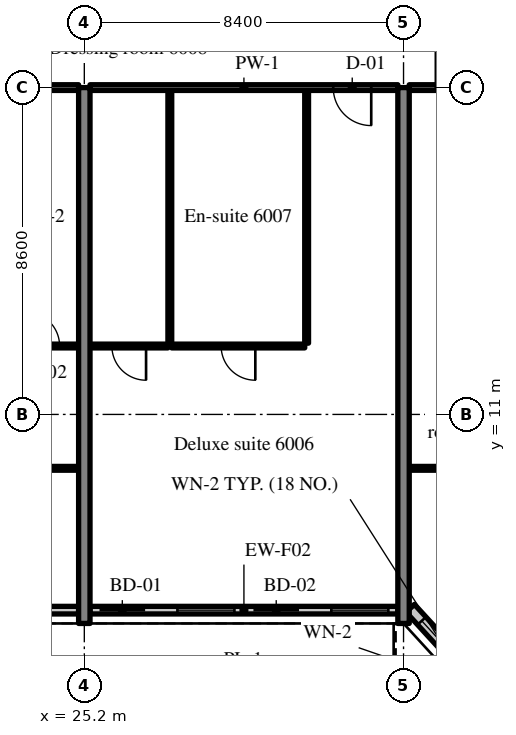
"""IFC4 building model, lengths in metres.
Left out: names, types, materials, properties, quantities, classifications, styles, units other than length and angle.
Written with IfcOpenShell. Run it as: python <this file> out.ifc"""

import sys

from ifc_helpers import new_model, si_unit, direction, frame, frame_2d, origin, place, context, subcontext, project, spatial, rectangle, extrude, source, transform, mapped, element, fill, save


model = new_model("IFC4")
c1 = context("Model", 3, precision=1e-05, world=origin(), true_north=direction((0.0, 1.0)))
c2 = subcontext(c1, "Body", "Model", "MODEL_VIEW")
j1 = project(units=[si_unit("LENGTHUNIT", "METRE"), si_unit("PLANEANGLEUNIT", "RADIAN")], contexts=[c1])
p1 = place(None, origin())
s1 = spatial("IfcSite", under=j1, at=p1, CompositionType="ELEMENT")
p2 = place(p1, origin())
s2 = spatial("IfcBuilding", under=s1, at=p2, CompositionType="ELEMENT")
p3 = place(p2, frame((0.0, 0.0, 249.1)))
s3 = spatial("IfcBuildingStorey", under=s2, at=p3, CompositionType="ELEMENT", Elevation=249.1)
m1 = source(origin(), c2, "Body", "SweptSolid", [
    extrude(rectangle(XDim=14.1, YDim=0.3, at=frame_2d((7.05, 0.0))), origin(), (0.0, 0.0, 1.0), 3.62),
])
for number, where, z_axis, x_axis in (
    (1, (25.2, 5.5, 0.0), (0.0, 0.0, 1.0), (0.0, 1.0, 0.0)),
    (2, (33.6, 5.5, 0.0), (0.0, 0.0, 1.0), (0.0, 1.0, 0.0)),
):
    element("IfcWall", number, at=place(p3, frame(where, z_axis=z_axis, x_axis=x_axis)), inside=s3, PredefinedType="SHEAR", context=c2, shape_type="MappedRepresentation", body=[
        mapped(m1, transform((0.0, 0.0, 0.0), scale=1.0)),
    ])
m2 = source(origin(), c2, "Body", "SweptSolid", [
    extrude(rectangle(XDim=6.505, YDim=0.2, at=frame_2d((3.252, 0.0))), origin(), (0.0, 0.0, 1.0), 3.02),
])
p4 = place(p3, frame((18.545, 5.85, 0.0), z_axis=(0.0, 0.0, 1.0), x_axis=(1.0, 0.0, 0.0)))
e3 = element("IfcWall", 3, at=p4, inside=s3, PredefinedType="SOLIDWALL", context=c2, shape_type="MappedRepresentation", body=[
    mapped(m2, transform((0.0, 0.0, 0.0), scale=1.0)),
])
m3 = source(origin(), c2, "Body", "SweptSolid", [
    extrude(rectangle(XDim=1.5, YDim=1.5, at=frame_2d((0.75, 0.75))), frame((0.0, 0.11, 0.0), z_axis=(0.0, -1.0, 0.0), x_axis=(1.0, 0.0, 0.0)), (0.0, 0.0, 1.0), 0.22),
])
p5 = place(p4, frame((0.876, 0.0, 0.9)))
e4 = element("IfcOpeningElement", 4, at=p5, cuts=e3, PredefinedType="OPENING", context=c2, shape_type="MappedRepresentation", body=[
    mapped(m3, transform((0.0, 0.0, 0.0), scale=1.0)),
])
p6 = place(p4, frame((4.129, 0.0, 0.9)))
e5 = element("IfcOpeningElement", 5, at=p6, cuts=e3, PredefinedType="OPENING", context=c2, shape_type="MappedRepresentation", body=[
    mapped(m3, transform((0.0, 0.0, 0.0), scale=1.0)),
])
m4 = source(origin(), c2, "Body", "SweptSolid", [
    extrude(rectangle(XDim=8.1, YDim=0.2, at=frame_2d((4.05, 0.0))), origin(), (0.0, 0.0, 1.0), 3.02),
])
p7 = place(p3, frame((25.35, 5.85, 0.0), z_axis=(0.0, 0.0, 1.0), x_axis=(1.0, 0.0, 0.0)))
e6 = element("IfcWall", 6, at=p7, inside=s3, PredefinedType="SOLIDWALL", context=c2, shape_type="MappedRepresentation", body=[
    mapped(m4, transform((0.0, 0.0, 0.0), scale=1.0)),
])
m5 = source(origin(), c2, "Body", "SweptSolid", [
    extrude(rectangle(XDim=1.2, YDim=2.4, at=frame_2d((0.6, 1.2))), frame((0.0, 0.11, 0.0), z_axis=(0.0, -1.0, 0.0), x_axis=(1.0, 0.0, 0.0)), (0.0, 0.0, 1.0), 0.22),
])
p8 = place(p7, frame((0.25, 0.0, 0.0)))
e7 = element("IfcOpeningElement", 7, at=p8, cuts=e6, PredefinedType="OPENING", context=c2, shape_type="MappedRepresentation", body=[
    mapped(m5, transform((0.0, 0.0, 0.0), scale=1.0)),
])
p9 = place(p7, frame((2.3, 0.0, 0.9)))
e8 = element("IfcOpeningElement", 8, at=p9, cuts=e6, PredefinedType="OPENING", context=c2, shape_type="MappedRepresentation", body=[
    mapped(m3, transform((0.0, 0.0, 0.0), scale=1.0)),
])
p10 = place(p7, frame((4.3, 0.0, 0.0)))
e9 = element("IfcOpeningElement", 9, at=p10, cuts=e6, PredefinedType="OPENING", context=c2, shape_type="MappedRepresentation", body=[
    mapped(m5, transform((0.0, 0.0, 0.0), scale=1.0)),
])
p11 = place(p7, frame((6.35, 0.0, 0.9)))
e10 = element("IfcOpeningElement", 10, at=p11, cuts=e6, PredefinedType="OPENING", context=c2, shape_type="MappedRepresentation", body=[
    mapped(m3, transform((0.0, 0.0, 0.0), scale=1.0)),
])
m6 = source(origin(), c2, "Body", "SweptSolid", [
    extrude(rectangle(XDim=2.398, YDim=0.3, at=frame_2d((1.199, 0.0))), origin(), (0.0, 0.0, 1.0), 3.62),
])
p12 = place(p3, frame((33.776, 5.9, 0.0), z_axis=(0.0, 0.0, 1.0), x_axis=(0.675374189419, -0.737475222815, 0.0)))
e11 = element("IfcWall", 11, at=p12, inside=s3, PredefinedType="SOLIDWALL", context=c2, shape_type="MappedRepresentation", body=[
    mapped(m6, transform((0.0, 0.0, 0.0), scale=1.0)),
])
m7 = source(origin(), c2, "Body", "SweptSolid", [
    extrude(rectangle(XDim=1.5, YDim=2.0, at=frame_2d((0.75, 1.0))), frame((0.0, 0.16, 0.0), z_axis=(0.0, -1.0, 0.0), x_axis=(1.0, 0.0, 0.0)), (0.0, 0.0, 1.0), 0.32),
])
p13 = place(p12, frame((0.449, 0.0, 0.9)))
e12 = element("IfcOpeningElement", 12, at=p13, cuts=e11, PredefinedType="OPENING", context=c2, shape_type="MappedRepresentation", body=[
    mapped(m7, transform((0.0, 0.0, 0.0), scale=1.0)),
])
m8 = source(origin(), c2, "Body", "SweptSolid", [
    extrude(rectangle(XDim=1.9, YDim=0.1, at=frame_2d((0.95, 0.0))), origin(), (0.0, 0.0, 1.0), 3.62),
])
p14 = place(p3, frame((23.15, 12.8, 0.0), z_axis=(0.0, 0.0, 1.0), x_axis=(1.0, 0.0, 0.0)))
e13 = element("IfcWall", 13, at=p14, inside=s3, PredefinedType="PARTITIONING", context=c2, shape_type="MappedRepresentation", body=[
    mapped(m8, transform((0.0, 0.0, 0.0), scale=1.0)),
])
m9 = source(origin(), c2, "Body", "SweptSolid", [
    extrude(rectangle(XDim=0.9, YDim=2.1, at=frame_2d((0.45, 1.05))), frame((0.0, 0.06, 0.0), z_axis=(0.0, -1.0, 0.0), x_axis=(1.0, 0.0, 0.0)), (0.0, 0.0, 1.0), 0.12),
])
p15 = place(p14, frame((0.5, 0.0, 0.0)))
e14 = element("IfcOpeningElement", 14, at=p15, cuts=e13, PredefinedType="OPENING", context=c2, shape_type="MappedRepresentation", body=[
    mapped(m9, transform((0.0, 0.0, 0.0), scale=1.0)),
])
m10 = source(origin(), c2, "Body", "SweptSolid", [
    extrude(rectangle(XDim=7.95, YDim=0.1, at=frame_2d((3.975, 0.0))), origin(), (0.0, 0.0, 1.0), 3.62),
])
p16 = place(p3, frame((17.1, 9.582, 0.0), z_axis=(0.0, 0.0, 1.0), x_axis=(1.0, 0.0, 0.0)))
e15 = element("IfcWall", 15, at=p16, inside=s3, PredefinedType="PARTITIONING", context=c2, shape_type="MappedRepresentation", body=[
    mapped(m10, transform((0.0, 0.0, 0.0), scale=1.0)),
])
m11 = source(origin(), c2, "Body", "SweptSolid", [
    extrude(rectangle(XDim=1.8, YDim=2.1, at=frame_2d((0.9, 1.05))), frame((0.0, 0.06, 0.0), z_axis=(0.0, -1.0, 0.0), x_axis=(1.0, 0.0, 0.0)), (0.0, 0.0, 1.0), 0.12),
])
p17 = place(p16, frame((3.075, 0.0, 0.0)))
e16 = element("IfcOpeningElement", 16, at=p17, cuts=e15, PredefinedType="OPENING", context=c2, shape_type="MappedRepresentation", body=[
    mapped(m11, transform((0.0, 0.0, 0.0), scale=1.0)),
])
m12 = source(origin(), c2, "Body", "SweptSolid", [
    extrude(rectangle(XDim=7.95, YDim=0.15, at=frame_2d((3.975, 0.0))), origin(), (0.0, 0.0, 1.0), 2.92),
])
p18 = place(p3, frame((17.1, 19.6, 0.0), z_axis=(0.0, 0.0, 1.0), x_axis=(1.0, 0.0, 0.0)))
e17 = element("IfcWall", 17, at=p18, inside=s3, PredefinedType="PARTITIONING", context=c2, shape_type="MappedRepresentation", body=[
    mapped(m12, transform((0.0, 0.0, 0.0), scale=1.0)),
])
m13 = source(origin(), c2, "Body", "SweptSolid", [
    extrude(rectangle(XDim=1.0, YDim=2.1, at=frame_2d((0.5, 1.05))), frame((0.0, 0.085, 0.0), z_axis=(0.0, -1.0, 0.0), x_axis=(1.0, 0.0, 0.0)), (0.0, 0.0, 1.0), 0.17),
])
p19 = place(p18, frame((0.7, 0.0, 0.0)))
e18 = element("IfcOpeningElement", 18, at=p19, cuts=e17, PredefinedType="OPENING", context=c2, shape_type="MappedRepresentation", body=[
    mapped(m13, transform((0.0, 0.0, 0.0), scale=1.0)),
])
m14 = source(origin(), c2, "Body", "SweptSolid", [
    extrude(rectangle(XDim=6.65, YDim=0.1, at=frame_2d((3.325, 0.0))), origin(), (0.0, 0.0, 1.0), 3.62),
])
for number, where, z_axis, x_axis in (
    (19, (31.05, 12.875, 0.0), (0.0, 0.0, 1.0), (0.0, 1.0, 0.0)),
    (20, (27.45, 12.875, 0.0), (0.0, 0.0, 1.0), (0.0, 1.0, 0.0)),
):
    element("IfcWall", number, at=place(p3, frame(where, z_axis=z_axis, x_axis=x_axis)), inside=s3, PredefinedType="PARTITIONING", context=c2, shape_type="MappedRepresentation", body=[
        mapped(m14, transform((0.0, 0.0, 0.0), scale=1.0)),
    ])
m15 = source(origin(), c2, "Body", "SweptSolid", [
    extrude(rectangle(XDim=3.5, YDim=0.1, at=frame_2d((1.75, 0.0))), origin(), (0.0, 0.0, 1.0), 3.62),
])
p20 = place(p3, frame((27.5, 12.8, 0.0), z_axis=(0.0, 0.0, 1.0), x_axis=(1.0, 0.0, 0.0)))
e21 = element("IfcWall", 21, at=p20, inside=s3, PredefinedType="PARTITIONING", context=c2, shape_type="MappedRepresentation", body=[
    mapped(m15, transform((0.0, 0.0, 0.0), scale=1.0)),
])
p21 = place(p20, frame((1.3, 0.0, 0.0)))
e22 = element("IfcOpeningElement", 22, at=p21, cuts=e21, PredefinedType="OPENING", context=c2, shape_type="MappedRepresentation", body=[
    mapped(m9, transform((0.0, 0.0, 0.0), scale=1.0)),
])
m16 = source(origin(), c2, "Body", "SweptSolid", [
    extrude(rectangle(XDim=2.05, YDim=0.1, at=frame_2d((1.025, 0.0))), origin(), (0.0, 0.0, 1.0), 3.62),
])
p22 = place(p3, frame((25.35, 12.8, 0.0), z_axis=(0.0, 0.0, 1.0), x_axis=(1.0, 0.0, 0.0)))
e23 = element("IfcWall", 23, at=p22, inside=s3, PredefinedType="PARTITIONING", context=c2, shape_type="MappedRepresentation", body=[
    mapped(m16, transform((0.0, 0.0, 0.0), scale=1.0)),
])
p23 = place(p22, frame((0.575, 0.0, 0.0)))
e24 = element("IfcOpeningElement", 24, at=p23, cuts=e23, PredefinedType="OPENING", context=c2, shape_type="MappedRepresentation", body=[
    mapped(m9, transform((0.0, 0.0, 0.0), scale=1.0)),
])
m17 = source(origin(), c2, "Body", "SweptSolid", [
    extrude(rectangle(XDim=8.1, YDim=0.15, at=frame_2d((4.05, 0.0))), origin(), (0.0, 0.0, 1.0), 2.92),
])
p24 = place(p3, frame((25.35, 19.6, 0.0), z_axis=(0.0, 0.0, 1.0), x_axis=(1.0, 0.0, 0.0)))
e25 = element("IfcWall", 25, at=p24, inside=s3, PredefinedType="PARTITIONING", context=c2, shape_type="MappedRepresentation", body=[
    mapped(m17, transform((0.0, 0.0, 0.0), scale=1.0)),
])
p25 = place(p24, frame((6.4, 0.0, 0.0)))
e26 = element("IfcOpeningElement", 26, at=p25, cuts=e25, PredefinedType="OPENING", context=c2, shape_type="MappedRepresentation", body=[
    mapped(m13, transform((0.0, 0.0, 0.0), scale=1.0)),
])
m18 = source(origin(), c2, "Body", "SweptSolid", [
    extrude(rectangle(XDim=8.1, YDim=0.1, at=frame_2d((4.05, 0.0))), origin(), (0.0, 0.0, 1.0), 3.62),
])
p26 = place(p3, frame((33.75, 9.582, 0.0), z_axis=(0.0, 0.0, 1.0), x_axis=(1.0, 0.0, 0.0)))
e27 = element("IfcWall", 27, at=p26, inside=s3, PredefinedType="PARTITIONING", context=c2, shape_type="MappedRepresentation", body=[
    mapped(m18, transform((0.0, 0.0, 0.0), scale=1.0)),
])
p27 = place(p26, frame((3.15, 0.0, 0.0)))
e28 = element("IfcOpeningElement", 28, at=p27, cuts=e27, PredefinedType="OPENING", context=c2, shape_type="MappedRepresentation", body=[
    mapped(m11, transform((0.0, 0.0, 0.0), scale=1.0)),
])
m19 = source(origin(), c2, "Body", "SweptSolid", [
    extrude(rectangle(XDim=8.1, YDim=0.15, at=frame_2d((4.05, 0.0))), origin(), (0.0, 0.0, 1.0), 2.92),
])
p28 = place(p3, frame((33.75, 19.6, 0.0), z_axis=(0.0, 0.0, 1.0), x_axis=(1.0, 0.0, 0.0)))
e29 = element("IfcWall", 29, at=p28, inside=s3, PredefinedType="PARTITIONING", context=c2, shape_type="MappedRepresentation", body=[
    mapped(m19, transform((0.0, 0.0, 0.0), scale=1.0)),
])
p29 = place(p28, frame((0.7, 0.0, 0.0)))
e30 = element("IfcOpeningElement", 30, at=p29, cuts=e29, PredefinedType="OPENING", context=c2, shape_type="MappedRepresentation", body=[
    mapped(m13, transform((0.0, 0.0, 0.0), scale=1.0)),
])
m20 = source(origin(), c2, "Body", "SweptSolid", [
    extrude(rectangle(XDim=1.2, YDim=2.4, at=frame_2d((0.6, 1.2))), frame((0.0, 0.025, 0.0), z_axis=(0.0, -1.0, 0.0), x_axis=(1.0, 0.0, 0.0)), (0.0, 0.0, 1.0), 0.05),
])
p30 = place(p8, origin())
e31 = element("IfcDoor", 31, at=p30, inside=s3, OperationType="SLIDING_TO_LEFT", PredefinedType="DOOR", context=c2, shape_type="MappedRepresentation", body=[
    mapped(m20, transform((0.0, 0.0, 0.0), scale=1.0)),
])
fill(e7, e31)
m21 = source(origin(), c2, "Body", "SweptSolid", [
    extrude(rectangle(XDim=1.5, YDim=1.5, at=frame_2d((0.75, 0.75))), frame((0.0, 0.03, 0.0), z_axis=(0.0, -1.0, 0.0), x_axis=(1.0, 0.0, 0.0)), (0.0, 0.0, 1.0), 0.06),
])
p31 = place(p9, origin())
e32 = element("IfcWindow", 32, at=p31, inside=s3, PartitioningType="SINGLE_PANEL", PredefinedType="WINDOW", context=c2, shape_type="MappedRepresentation", body=[
    mapped(m21, transform((0.0, 0.0, 0.0), scale=1.0)),
])
fill(e8, e32)
p32 = place(p10, origin())
e33 = element("IfcDoor", 33, at=p32, inside=s3, OperationType="SLIDING_TO_RIGHT", PredefinedType="DOOR", context=c2, shape_type="MappedRepresentation", body=[
    mapped(m20, transform((0.0, 0.0, 0.0), scale=1.0)),
])
fill(e9, e33)
p33 = place(p11, origin())
e34 = element("IfcWindow", 34, at=p33, inside=s3, PartitioningType="SINGLE_PANEL", PredefinedType="WINDOW", context=c2, shape_type="MappedRepresentation", body=[
    mapped(m21, transform((0.0, 0.0, 0.0), scale=1.0)),
])
fill(e10, e34)
m22 = source(origin(), c2, "Body", "SweptSolid", [
    extrude(rectangle(XDim=1.5, YDim=2.0, at=frame_2d((0.75, 1.0))), frame((0.0, 0.03, 0.0), z_axis=(0.0, -1.0, 0.0), x_axis=(1.0, 0.0, 0.0)), (0.0, 0.0, 1.0), 0.06),
])
p34 = place(p13, origin())
e35 = element("IfcWindow", 35, at=p34, inside=s3, PartitioningType="SINGLE_PANEL", PredefinedType="WINDOW", context=c2, shape_type="MappedRepresentation", body=[
    mapped(m22, transform((0.0, 0.0, 0.0), scale=1.0)),
])
fill(e12, e35)
m23 = source(origin(), c2, "Body", "SweptSolid", [
    extrude(rectangle(XDim=0.9, YDim=2.1, at=frame_2d((0.45, 1.05))), frame((0.0, 0.025, 0.0), z_axis=(0.0, -1.0, 0.0), x_axis=(1.0, 0.0, 0.0)), (0.0, 0.0, 1.0), 0.05),
])
p35 = place(p15, origin())
e36 = element("IfcDoor", 36, at=p35, inside=s3, OperationType="SINGLE_SWING_LEFT", PredefinedType="DOOR", context=c2, shape_type="MappedRepresentation", body=[
    mapped(m23, transform((0.0, 0.0, 0.0), scale=1.0)),
])
fill(e14, e36)
p36 = place(p21, origin())
e37 = element("IfcDoor", 37, at=p36, inside=s3, OperationType="SINGLE_SWING_RIGHT", PredefinedType="DOOR", context=c2, shape_type="MappedRepresentation", body=[
    mapped(m23, transform((0.0, 0.0, 0.0), scale=1.0)),
])
fill(e22, e37)
p37 = place(p23, origin())
e38 = element("IfcDoor", 38, at=p37, inside=s3, OperationType="SINGLE_SWING_RIGHT", PredefinedType="DOOR", context=c2, shape_type="MappedRepresentation", body=[
    mapped(m23, transform((0.0, 0.0, 0.0), scale=1.0)),
])
fill(e24, e38)
m24 = source(origin(), c2, "Body", "SweptSolid", [
    extrude(rectangle(XDim=1.0, YDim=2.1, at=frame_2d((0.5, 1.05))), frame((0.0, 0.025, 0.0), z_axis=(0.0, -1.0, 0.0), x_axis=(1.0, 0.0, 0.0)), (0.0, 0.0, 1.0), 0.05),
])
p38 = place(p25, origin())
e39 = element("IfcDoor", 39, at=p38, inside=s3, OperationType="SINGLE_SWING_RIGHT", PredefinedType="DOOR", context=c2, shape_type="MappedRepresentation", body=[
    mapped(m24, transform((0.0, 0.0, 0.0), scale=1.0)),
])
fill(e26, e39)
save(model, sys.argv[1])
